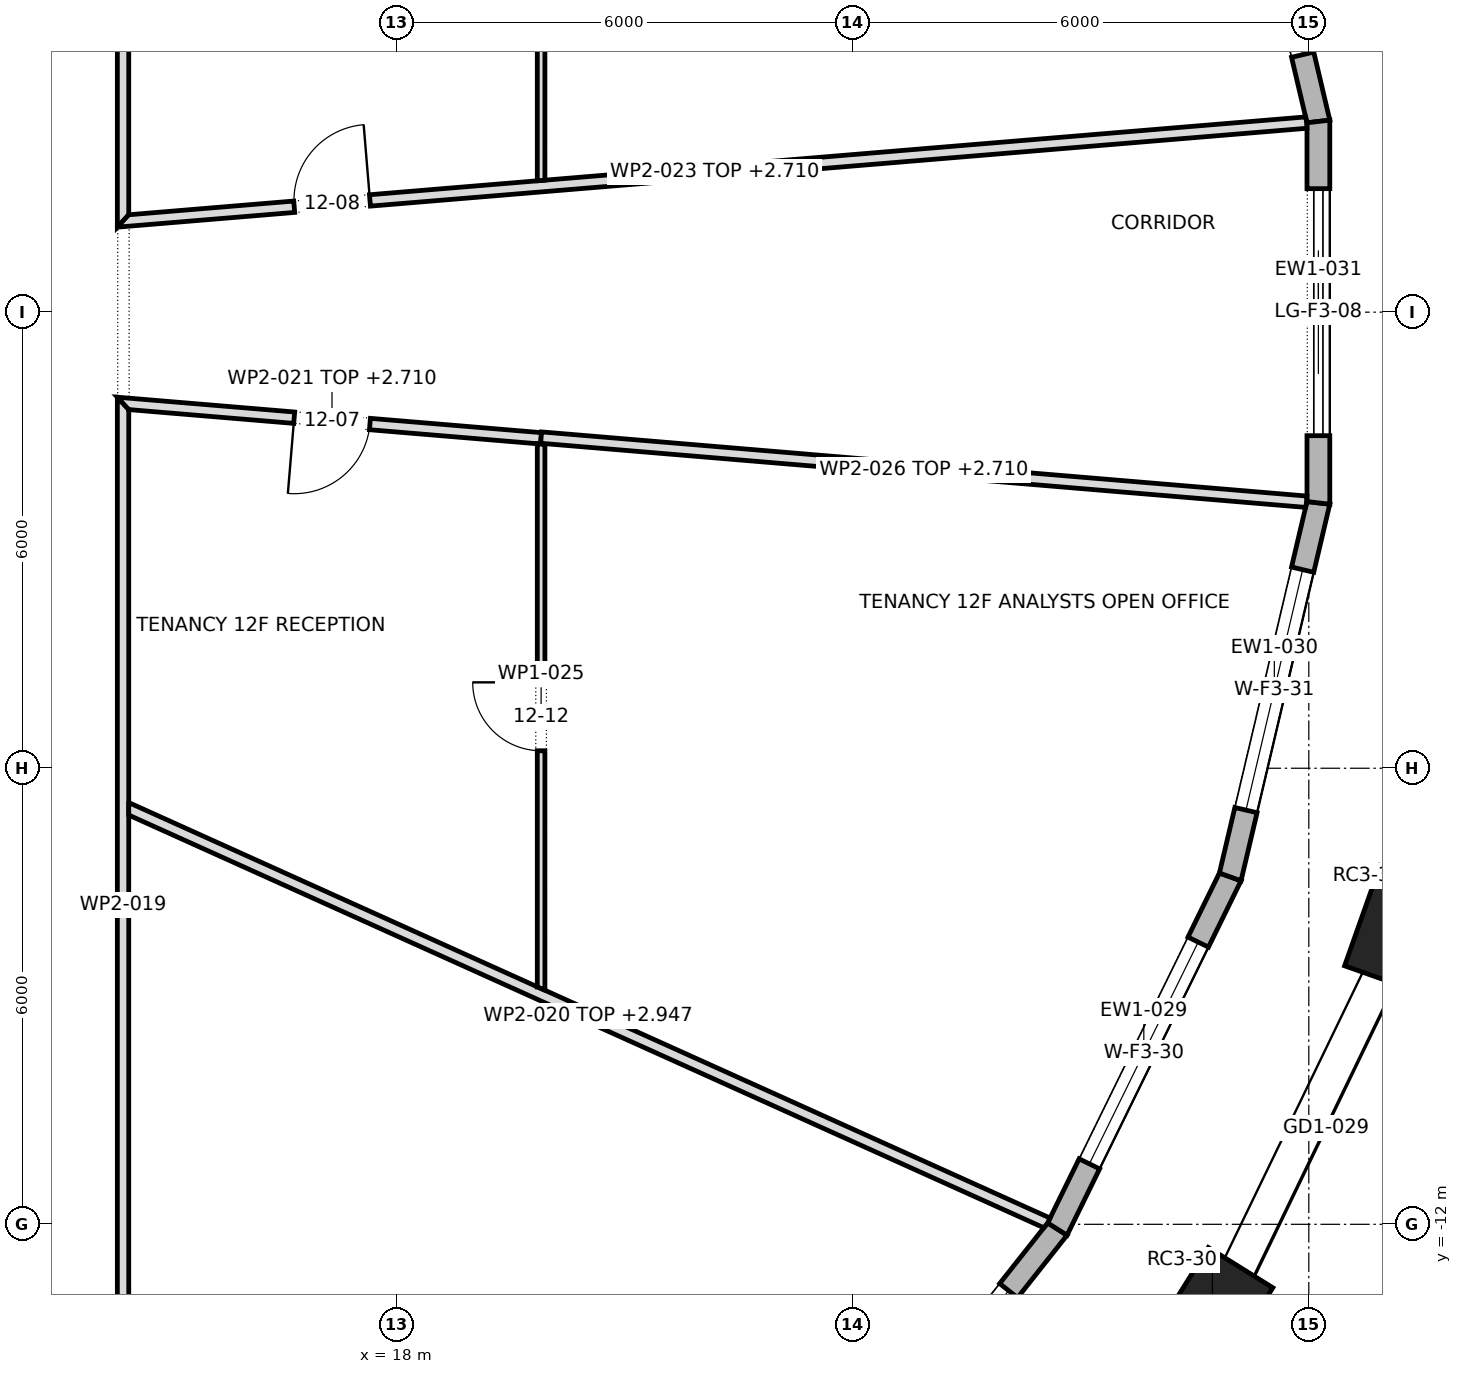
"""IFC4 building model, lengths in metres.
Left out: names, types, materials, properties, quantities, classifications, styles, units other than length and angle.
Written with IfcOpenShell. Run it as: python <this file> out.ifc"""

import sys

from ifc_helpers import new_model, si_unit, direction, frame, frame_2d, origin, origin_2d, place, context, subcontext, project, spatial, polyline, rectangle, outline, extrude, element, fill, save


model = new_model("IFC4")
c1 = context("Model", 3, precision=1e-05, world=origin(), true_north=direction((0.0, 1.0)))
c2 = subcontext(c1, "Body", "Model", "MODEL_VIEW")
j1 = project(units=[si_unit("LENGTHUNIT", "METRE"), si_unit("PLANEANGLEUNIT", "RADIAN")], contexts=[c1])
p1 = place(None, origin())
s1 = spatial("IfcSite", under=j1, at=p1, CompositionType="ELEMENT")
p2 = place(p1, origin())
s2 = spatial("IfcBuilding", under=s1, at=p2, CompositionType="ELEMENT")
p3 = place(p2, frame((0.0, 0.0, 186.9)))
s3 = spatial("IfcBuildingStorey", under=s2, at=p3, CompositionType="ELEMENT", Elevation=186.9)
for number, where, z_axis, x_axis in (
    (1, (28.732, -13.164, 0.0), (0.0, 0.0, 1.0), (0.529, 0.849, 0.0)),
    (2, (31.176, -8.106, 0.0), (0.0, 0.0, 1.0), (0.334, 0.943, 0.0)),
):
    element("IfcColumn", number, at=place(p3, frame(where, z_axis=z_axis, x_axis=x_axis)), inside=s3, PredefinedType="COLUMN", context=c2, shape_type="SweptSolid", body=[
        extrude(rectangle(XDim=1.4, YDim=1.0, at=origin_2d()), origin(), (0.0, 0.0, 1.0), 4.0),
    ])
p4 = place(p3, frame((30.126, 2.509, 0.0), z_axis=(0.0, 0.0, 1.0), x_axis=(-0.229434992017, 0.973323987395, 0.0)))
e3 = element("IfcWall", 3, at=p4, inside=s3, PredefinedType="STANDARD", context=c2, shape_type="SweptSolid", body=[
    extrude(outline(polyline([(-0.017, -0.15), (5.072, -0.15), (5.039, 0.15), (0.017, 0.15), (-0.017, -0.15)])), origin(), (0.0, 0.0, 1.0), 3.7),
])
p5 = place(p4, frame((0.903, 0.0, 0.6)))
e4 = element("IfcOpeningElement", 4, at=p5, cuts=e3, PredefinedType="OPENING", context=c2, shape_type="SweptSolid", body=[
    extrude(rectangle(XDim=3.25, YDim=2.65, at=frame_2d((1.625, 1.325))), frame((0.0, 0.162, 0.0), z_axis=(0.0, -1.0, 0.0), x_axis=(1.0, 0.0, 0.0)), (0.0, 0.0, 1.0), 0.324),
])
p6 = place(p3, frame((23.392, -16.23, 0.0), z_axis=(0.0, 0.0, 1.0), x_axis=(0.620766467446, 0.78399553117, 0.0)))
e5 = element("IfcWall", 5, at=p6, inside=s3, PredefinedType="STANDARD", context=c2, shape_type="SweptSolid", body=[
    extrude(outline(polyline([(-0.015, -0.15), (5.332, -0.15), (5.3, 0.15), (0.015, 0.15), (-0.015, -0.15)])), origin(), (0.0, 0.0, 1.0), 3.7),
])
p7 = place(p6, frame((1.033, 0.0, 0.6)))
e6 = element("IfcOpeningElement", 6, at=p7, cuts=e5, PredefinedType="OPENING", context=c2, shape_type="SweptSolid", body=[
    extrude(rectangle(XDim=3.25, YDim=2.65, at=frame_2d((1.625, 1.325))), frame((0.0, 0.162, 0.0), z_axis=(0.0, -1.0, 0.0), x_axis=(1.0, 0.0, 0.0)), (0.0, 0.0, 1.0), 0.324),
])
p8 = place(p3, frame((26.692, -12.062, 0.0), z_axis=(0.0, 0.0, 1.0), x_axis=(0.440673883676, 0.897667270343, 0.0)))
e7 = element("IfcWall", 7, at=p8, inside=s3, PredefinedType="STANDARD", context=c2, shape_type="SweptSolid", body=[
    extrude(outline(polyline([(-0.016, -0.15), (5.178, -0.15), (5.144, 0.15), (0.016, 0.15), (-0.016, -0.15)])), origin(), (0.0, 0.0, 1.0), 3.7),
])
p9 = place(p8, frame((0.956, 0.0, 0.6)))
e8 = element("IfcOpeningElement", 8, at=p9, cuts=e7, PredefinedType="OPENING", context=c2, shape_type="SweptSolid", body=[
    extrude(rectangle(XDim=3.25, YDim=2.65, at=frame_2d((1.625, 1.325))), frame((0.0, 0.162, 0.0), z_axis=(0.0, -1.0, 0.0), x_axis=(1.0, 0.0, 0.0)), (0.0, 0.0, 1.0), 0.324),
])
p10 = place(p3, frame((28.966, -7.429, 0.0), z_axis=(0.0, 0.0, 1.0), x_axis=(0.229434992017, 0.973323987395, 0.0)))
e9 = element("IfcWall", 9, at=p10, inside=s3, PredefinedType="STANDARD", context=c2, shape_type="SweptSolid", body=[
    extrude(outline(polyline([(-0.017, -0.15), (5.073, -0.15), (5.038, 0.15), (0.017, 0.15), (-0.017, -0.15)])), origin(), (0.0, 0.0, 1.0), 3.7),
])
p11 = place(p10, frame((0.903, 0.0, 0.6)))
e10 = element("IfcOpeningElement", 10, at=p11, cuts=e9, PredefinedType="OPENING", context=c2, shape_type="SweptSolid", body=[
    extrude(rectangle(XDim=3.25, YDim=2.65, at=frame_2d((1.625, 1.325))), frame((0.0, 0.162, 0.0), z_axis=(0.0, -1.0, 0.0), x_axis=(1.0, 0.0, 0.0)), (0.0, 0.0, 1.0), 0.324),
])
p12 = place(p3, frame((30.126, -2.509, 0.0), z_axis=(0.0, 0.0, 1.0), x_axis=(0.0, 1.0, 0.0)))
e11 = element("IfcWall", 11, at=p12, inside=s3, PredefinedType="STANDARD", context=c2, shape_type="SweptSolid", body=[
    extrude(outline(polyline([(-0.017, -0.15), (5.035, -0.15), (5.0, 0.15), (0.017, 0.15), (-0.017, -0.15)])), origin(), (0.0, 0.0, 1.0), 3.7),
])
p13 = place(p12, frame((0.884, 0.0, 0.0)))
e12 = element("IfcOpeningElement", 12, at=p13, cuts=e11, PredefinedType="OPENING", context=c2, shape_type="SweptSolid", body=[
    extrude(rectangle(XDim=3.25, YDim=3.25, at=frame_2d((1.625, 1.625))), frame((0.0, 0.162, 0.0), z_axis=(0.0, -1.0, 0.0), x_axis=(1.0, 0.0, 0.0)), (0.0, 0.0, 1.0), 0.324),
])
p14 = place(p3, frame((14.4, -14.475, 0.0), z_axis=(0.0, 0.0, 1.0), x_axis=(0.0, 1.0, 0.0)))
e13 = element("IfcWall", 13, at=p14, inside=s3, PredefinedType="PARTITIONING", context=c2, shape_type="SweptSolid", body=[
    extrude(outline(polyline([(0.0, -0.075), (1.885, -0.075), (3.77, -0.075), (5.655, -0.075), (7.539, -0.075), (9.424, -0.075), (11.309, -0.075), (13.194, -0.075), (13.357, 0.075), (11.47, 0.075), (9.583, 0.075), (7.697, 0.075), (5.81, 0.075), (3.923, 0.075), (2.037, 0.075), (0.15, 0.075), (0.0, -0.075)])), origin(), (0.0, 0.0, 1.0), 3.7),
])
p15 = place(p3, frame((14.444, -6.52, 0.0), z_axis=(0.0, 0.0, 1.0), x_axis=(0.911592423636, -0.411095187479, 0.0)))
e14 = element("IfcWall", 14, at=p15, inside=s3, PredefinedType="PARTITIONING", context=c2, shape_type="SweptSolid", body=[
    extrude(outline(polyline([(0.068, -0.075), (1.954, -0.075), (3.841, -0.075), (5.728, -0.075), (7.615, -0.075), (9.501, -0.075), (11.388, -0.075), (13.274, -0.075), (13.294, 0.003), (13.296, 0.072), (13.296, 0.075), (11.448, 0.075), (9.599, 0.075), (7.75, 0.075), (5.901, 0.075), (5.897, 0.073), (5.896, 0.075), (3.931, 0.075), (1.966, 0.075), (0.0, 0.075), (0.068, -0.075)])), origin(), (0.0, 0.0, 1.0), 2.947),
])
p16 = place(p3, frame((14.319, -1.193, 0.0), z_axis=(0.0, 0.0, 1.0), x_axis=(0.996519550004, -0.083359381354, 0.0)))
e15 = element("IfcWall", 15, at=p16, inside=s3, PredefinedType="PARTITIONING", context=c2, shape_type="SweptSolid", body=[
    extrude(outline(polyline([(0.163, -0.075), (1.973, -0.075), (3.783, -0.075), (5.593, -0.075), (5.6, -0.074), (5.6, 0.075), (3.733, 0.075), (1.867, 0.075), (0.0, 0.075), (0.082, 0.0), (0.163, -0.075)])), origin(), (0.0, 0.0, 1.0), 2.71),
])
p17 = place(p16, frame((2.341, 0.0, 0.0)))
e16 = element("IfcOpeningElement", 16, at=p17, cuts=e15, PredefinedType="OPENING", context=c2, shape_type="SweptSolid", body=[
    extrude(rectangle(XDim=1.0, YDim=2.1, at=frame_2d((0.5, 1.05))), frame((0.0, 0.087, 0.0), z_axis=(0.0, -1.0, 0.0), x_axis=(1.0, 0.0, 0.0)), (0.0, 0.0, 1.0), 0.174),
])
p18 = place(p3, frame((14.4, 1.118, 0.0), z_axis=(0.0, 0.0, 1.0), x_axis=(0.0, 1.0, 0.0)))
e17 = element("IfcWall", 17, at=p18, inside=s3, PredefinedType="PARTITIONING", context=c2, shape_type="SweptSolid", body=[
    extrude(outline(polyline([(0.163, -0.075), (2.048, -0.075), (3.933, -0.075), (5.817, -0.075), (7.702, -0.075), (9.587, -0.075), (11.472, -0.075), (13.356, -0.075), (13.207, 0.075), (11.32, 0.075), (9.433, 0.075), (7.547, 0.075), (5.66, 0.075), (3.773, 0.075), (1.887, 0.075), (0.0, 0.075), (0.163, -0.075)])), origin(), (0.0, 0.0, 1.0), 3.7),
])
p19 = place(p18, frame((8.832, 0.0, 0.0)))
e18 = element("IfcOpeningElement", 18, at=p19, cuts=e17, PredefinedType="OPENING", context=c2, shape_type="SweptSolid", body=[
    extrude(rectangle(XDim=1.0, YDim=2.1, at=frame_2d((0.5, 1.05))), frame((0.0, 0.087, 0.0), z_axis=(0.0, -1.0, 0.0), x_axis=(1.0, 0.0, 0.0)), (0.0, 0.0, 1.0), 0.174),
])
p20 = place(p3, frame((14.319, 1.193, 0.0), z_axis=(0.0, 0.0, 1.0), x_axis=(0.996561500002, 0.082856361942, 0.0)))
e19 = element("IfcWall", 19, at=p20, inside=s3, PredefinedType="PARTITIONING", context=c2, shape_type="SweptSolid", body=[
    extrude(outline(polyline([(0.0, -0.075), (1.963, -0.075), (3.926, -0.075), (5.889, -0.075), (7.853, -0.075), (9.816, -0.075), (11.779, -0.075), (13.742, -0.075), (15.705, -0.075), (15.705, -0.074), (15.705, 0.036), (15.699, 0.075), (13.757, 0.075), (11.815, 0.075), (9.873, 0.075), (7.931, 0.075), (5.989, 0.075), (4.047, 0.075), (2.105, 0.075), (0.163, 0.075), (0.082, 0.0), (0.0, -0.075), (0.0, -0.075)])), origin(), (0.0, 0.0, 1.0), 2.71),
])
p21 = place(p20, frame((2.341, 0.0, 0.0)))
e20 = element("IfcOpeningElement", 20, at=p21, cuts=e19, PredefinedType="OPENING", context=c2, shape_type="SweptSolid", body=[
    extrude(rectangle(XDim=1.0, YDim=2.1, at=frame_2d((0.5, 1.05))), frame((0.0, 0.087, 0.0), z_axis=(0.0, -1.0, 0.0), x_axis=(1.0, 0.0, 0.0)), (0.0, 0.0, 1.0), 0.174),
])
p22 = place(p3, frame((19.9, -1.729, 0.0), z_axis=(0.0, 0.0, 1.0), x_axis=(0.0, -1.0, 0.0)))
e21 = element("IfcWall", 21, at=p22, inside=s3, PredefinedType="PARTITIONING", context=c2, shape_type="SweptSolid", body=[
    extrude(outline(polyline([(0.002, -0.05), (1.788, -0.05), (3.574, -0.05), (5.36, -0.05), (7.146, -0.05), (7.191, 0.05), (7.191, 0.05), (5.393, 0.05), (3.595, 0.05), (1.798, 0.05), (0.0, 0.05), (0.0, -0.007), (0.005, -0.007), (0.002, -0.05)])), origin(), (0.0, 0.0, 1.0), 3.7),
])
p23 = place(p22, frame((3.14, 0.0, 0.0)))
e22 = element("IfcOpeningElement", 22, at=p23, cuts=e21, PredefinedType="OPENING", context=c2, shape_type="SweptSolid", body=[
    extrude(rectangle(XDim=0.9, YDim=2.1, at=frame_2d((0.45, 1.05))), frame((0.0, 0.062, 0.0), z_axis=(0.0, -1.0, 0.0), x_axis=(1.0, 0.0, 0.0)), (0.0, 0.0, 1.0), 0.124),
])
p24 = place(p3, frame((19.9, -1.65, 0.0), z_axis=(0.0, 0.0, 1.0), x_axis=(0.996505820255, -0.083523351209, 0.0)))
e23 = element("IfcWall", 23, at=p24, inside=s3, PredefinedType="PARTITIONING", context=c2, shape_type="SweptSolid", body=[
    extrude(outline(polyline([(0.0, -0.075), (1.683, -0.075), (3.366, -0.075), (5.05, -0.075), (6.733, -0.075), (8.417, -0.075), (10.1, -0.075), (10.105, -0.039), (10.105, 0.075), (8.421, 0.075), (6.737, 0.075), (5.052, 0.075), (3.368, 0.075), (1.684, 0.075), (0.0, 0.075), (0.0, -0.075)])), origin(), (0.0, 0.0, 1.0), 2.71),
])
p25 = place(p3, frame((19.9, 8.92, 0.0), z_axis=(0.0, 0.0, 1.0), x_axis=(0.0, -1.0, 0.0)))
e24 = element("IfcWall", 24, at=p25, inside=s3, PredefinedType="PARTITIONING", context=c2, shape_type="SweptSolid", body=[
    extrude(outline(polyline([(7.191, -0.05), (7.191, -0.048), (7.183, 0.05), (5.387, 0.05), (3.592, 0.05), (1.796, 0.05), (0.0, 0.05), (0.0, 0.049), (0.045, -0.05), (1.832, -0.05), (3.618, -0.05), (5.405, -0.05), (7.191, -0.05)])), origin(), (0.0, 0.0, 1.0), 3.7),
])
p26 = place(p25, frame((3.15, 0.0, 0.0)))
e25 = element("IfcOpeningElement", 25, at=p26, cuts=e24, PredefinedType="OPENING", context=c2, shape_type="SweptSolid", body=[
    extrude(rectangle(XDim=0.9, YDim=2.1, at=frame_2d((0.45, 1.05))), frame((0.0, 0.062, 0.0), z_axis=(0.0, -1.0, 0.0), x_axis=(1.0, 0.0, 0.0)), (0.0, 0.0, 1.0), 0.124),
])
p27 = place(p5, origin())
e26 = element("IfcWindow", 26, at=p27, inside=s3, PartitioningType="TRIPLE_PANEL_VERTICAL", PredefinedType="WINDOW", context=c2, shape_type="SweptSolid", body=[
    extrude(rectangle(XDim=3.25, YDim=2.65, at=frame_2d((1.625, 1.325))), frame((0.0, 0.03, 0.0), z_axis=(0.0, -1.0, 0.0), x_axis=(1.0, 0.0, 0.0)), (0.0, 0.0, 1.0), 0.06),
])
fill(e4, e26)
p28 = place(p7, origin())
e27 = element("IfcWindow", 27, at=p28, inside=s3, PartitioningType="TRIPLE_PANEL_VERTICAL", PredefinedType="WINDOW", context=c2, shape_type="SweptSolid", body=[
    extrude(rectangle(XDim=3.25, YDim=2.65, at=frame_2d((1.625, 1.325))), frame((0.0, 0.03, 0.0), z_axis=(0.0, -1.0, 0.0), x_axis=(1.0, 0.0, 0.0)), (0.0, 0.0, 1.0), 0.06),
])
fill(e6, e27)
p29 = place(p9, origin())
e28 = element("IfcWindow", 28, at=p29, inside=s3, PartitioningType="TRIPLE_PANEL_VERTICAL", PredefinedType="WINDOW", context=c2, shape_type="SweptSolid", body=[
    extrude(rectangle(XDim=3.25, YDim=2.65, at=frame_2d((1.625, 1.325))), frame((0.0, 0.03, 0.0), z_axis=(0.0, -1.0, 0.0), x_axis=(1.0, 0.0, 0.0)), (0.0, 0.0, 1.0), 0.06),
])
fill(e8, e28)
p30 = place(p11, origin())
e29 = element("IfcWindow", 29, at=p30, inside=s3, PartitioningType="TRIPLE_PANEL_VERTICAL", PredefinedType="WINDOW", context=c2, shape_type="SweptSolid", body=[
    extrude(rectangle(XDim=3.25, YDim=2.65, at=frame_2d((1.625, 1.325))), frame((0.0, 0.03, 0.0), z_axis=(0.0, -1.0, 0.0), x_axis=(1.0, 0.0, 0.0)), (0.0, 0.0, 1.0), 0.06),
])
fill(e10, e29)
p31 = place(p13, origin())
e30 = element("IfcDoor", 30, at=p31, inside=s3, OperationType="DOUBLE_DOOR_SLIDING", PredefinedType="DOOR", context=c2, shape_type="SweptSolid", body=[
    extrude(rectangle(XDim=3.25, YDim=3.25, at=frame_2d((1.625, 1.625))), frame((0.0, 0.025, 0.0), z_axis=(0.0, -1.0, 0.0), x_axis=(1.0, 0.0, 0.0)), (0.0, 0.0, 1.0), 0.05),
])
fill(e12, e30)
p32 = place(p17, frame((1.0, 0.0, 0.0), z_axis=(0.0, 0.0, 1.0), x_axis=(-1.0, 0.0, 0.0)))
e31 = element("IfcDoor", 31, at=p32, inside=s3, OperationType="SINGLE_SWING_LEFT", PredefinedType="DOOR", context=c2, shape_type="SweptSolid", body=[
    extrude(rectangle(XDim=1.0, YDim=2.1, at=frame_2d((0.5, 1.05))), frame((0.0, 0.025, 0.0), z_axis=(0.0, -1.0, 0.0), x_axis=(1.0, 0.0, 0.0)), (0.0, 0.0, 1.0), 0.05),
])
fill(e16, e31)
p33 = place(p21, origin())
e32 = element("IfcDoor", 32, at=p33, inside=s3, OperationType="SINGLE_SWING_LEFT", PredefinedType="DOOR", context=c2, shape_type="SweptSolid", body=[
    extrude(rectangle(XDim=1.0, YDim=2.1, at=frame_2d((0.5, 1.05))), frame((0.0, 0.025, 0.0), z_axis=(0.0, -1.0, 0.0), x_axis=(1.0, 0.0, 0.0)), (0.0, 0.0, 1.0), 0.05),
])
fill(e20, e32)
p34 = place(p23, frame((0.9, 0.0, 0.0), z_axis=(0.0, 0.0, 1.0), x_axis=(-1.0, 0.0, 0.0)))
e33 = element("IfcDoor", 33, at=p34, inside=s3, OperationType="SINGLE_SWING_LEFT", PredefinedType="DOOR", context=c2, shape_type="SweptSolid", body=[
    extrude(rectangle(XDim=0.9, YDim=2.1, at=frame_2d((0.45, 1.05))), frame((0.0, 0.025, 0.0), z_axis=(0.0, -1.0, 0.0), x_axis=(1.0, 0.0, 0.0)), (0.0, 0.0, 1.0), 0.05),
])
fill(e22, e33)
save(model, sys.argv[1])
